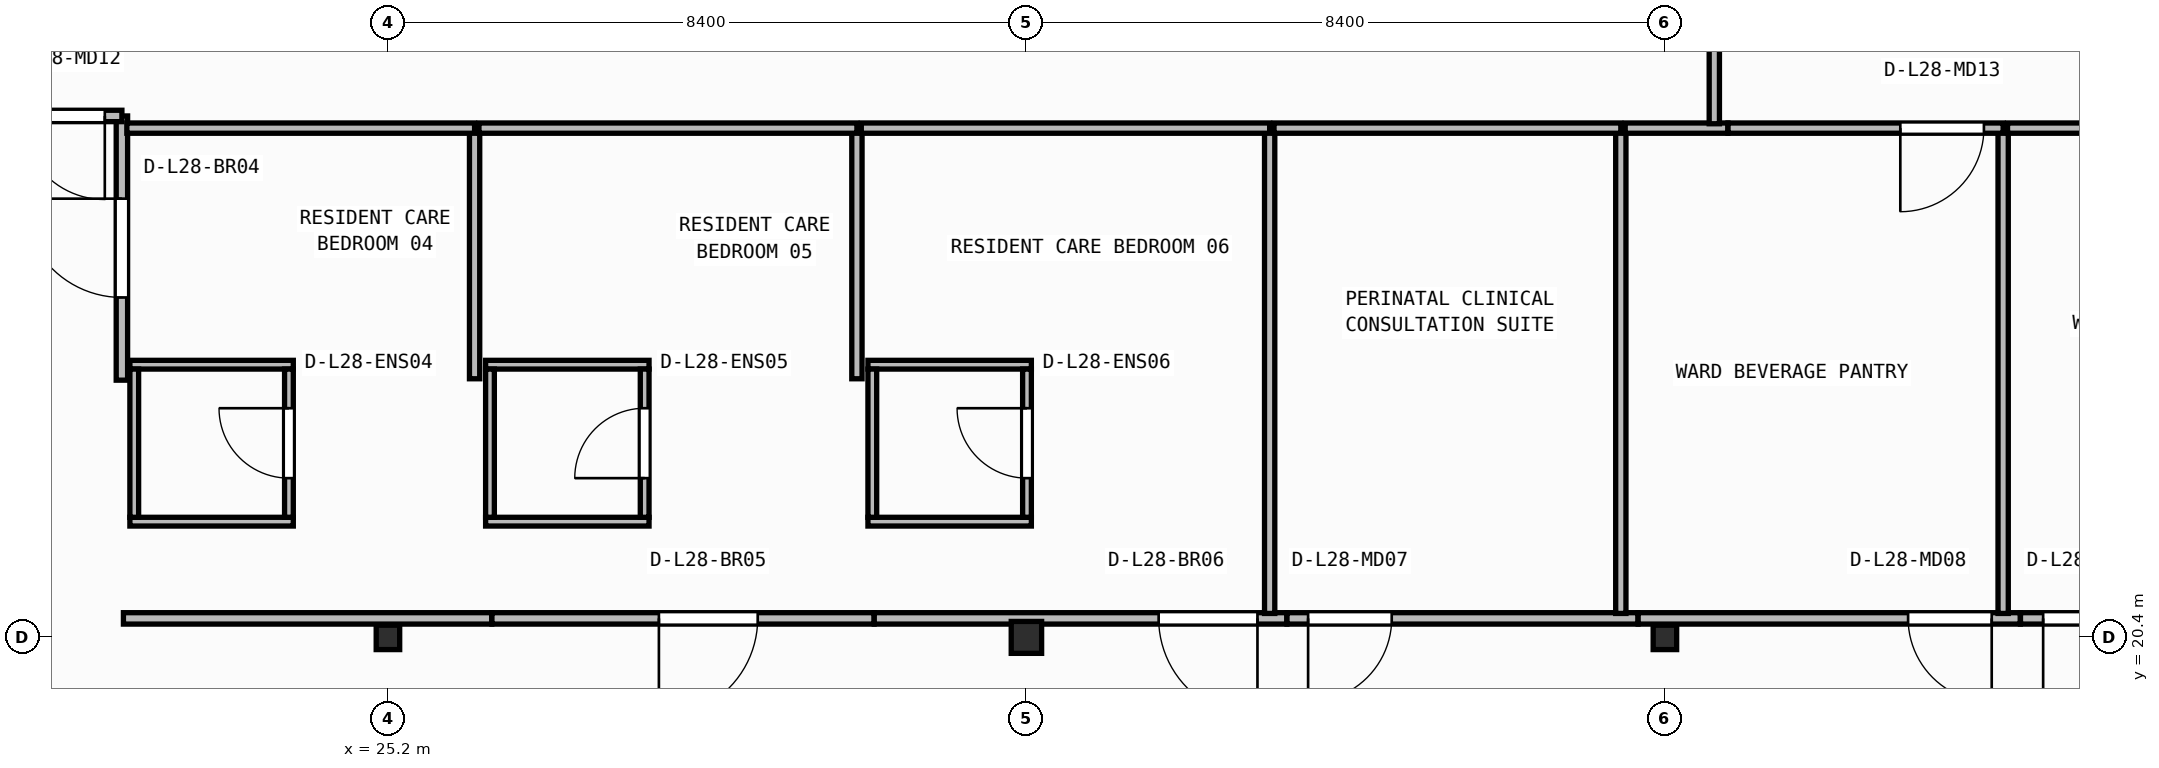
"""IFC4 building model, lengths in metres.
Left out: names, types, materials, properties, quantities, classifications, styles, units other than length and angle.
Written with IfcOpenShell. Run it as: python <this file> out.ifc"""

import sys

from ifc_helpers import new_model, si_unit, direction, frame, frame_2d, origin, origin_2d, place, context, subcontext, project, spatial, rectangle, i_section, extrude, element, fill, save


model = new_model("IFC4")
c1 = context("Model", 3, precision=1e-05, world=origin(), true_north=direction((0.0, 1.0)))
c2 = subcontext(c1, "Body", "Model", "MODEL_VIEW")
j1 = project(units=[si_unit("LENGTHUNIT", "METRE"), si_unit("PLANEANGLEUNIT", "RADIAN")], contexts=[c1])
p1 = place(None, origin())
s1 = spatial("IfcSite", under=j1, at=p1, CompositionType="ELEMENT")
p2 = place(p1, origin())
s2 = spatial("IfcBuilding", under=s1, at=p2, CompositionType="ELEMENT")
p3 = place(p2, frame((0.0, 0.0, 115.2)))
s3 = spatial("IfcBuildingStorey", under=s2, at=p3, CompositionType="ELEMENT", Elevation=115.2)
p4 = place(p3, frame((25.2, 20.4, 0.0), z_axis=(0.0, 0.0, 1.0), x_axis=(1.0, 0.0, 0.0)))
e1 = element("IfcColumn", 1, at=p4, inside=s3, PredefinedType="COLUMN", context=c2, shape_type="SweptSolid", body=[
    extrude(i_section(OverallWidth=0.309, OverallDepth=0.321, WebThickness=0.014, FlangeThickness=0.022, FilletRadius=0.017, at=origin_2d()), origin(), (0.0, 0.0, 1.0), 3.95),
])
p5 = place(p3, frame((33.6, 20.4, 0.0), z_axis=(0.0, 0.0, 1.0), x_axis=(1.0, 0.0, 0.0)))
e2 = element("IfcColumn", 2, at=p5, inside=s3, PredefinedType="COLUMN", context=c2, shape_type="SweptSolid", body=[
    extrude(i_section(OverallWidth=0.4, OverallDepth=0.42, WebThickness=0.025, FlangeThickness=0.04, at=origin_2d()), origin(), (0.0, 0.0, 1.0), 3.95),
])
p6 = place(p3, frame((42.0, 20.4, 0.0), z_axis=(0.0, 0.0, 1.0), x_axis=(1.0, 0.0, 0.0)))
e3 = element("IfcColumn", 3, at=p6, inside=s3, PredefinedType="COLUMN", context=c2, shape_type="SweptSolid", body=[
    extrude(i_section(OverallWidth=0.309, OverallDepth=0.321, WebThickness=0.014, FlangeThickness=0.022, FilletRadius=0.017, at=origin_2d()), origin(), (0.0, 0.0, 1.0), 3.95),
])
for number, where, z_axis, x_axis in (
    (4, (21.805, 21.923, 0.0), (0.0, 0.0, 1.0), (1.0, 0.0, 0.0)),
    (5, (21.805, 23.988, 0.0), (0.0, 0.0, 1.0), (1.0, 0.0, 0.0)),
):
    element("IfcWall", number, at=place(p3, frame(where, z_axis=z_axis, x_axis=x_axis)), inside=s3, PredefinedType="PARTITIONING", context=c2, shape_type="SweptSolid", body=[
        extrude(rectangle(XDim=2.15, YDim=0.115, at=frame_2d((1.075, 0.0))), origin(), (0.0, 0.0, 1.0), 3.71),
    ])
p7 = place(p3, frame((21.863, 21.98, 0.0), z_axis=(0.0, 0.0, 1.0), x_axis=(0.0, 1.0, 0.0)))
e6 = element("IfcWall", 6, at=p7, inside=s3, PredefinedType="PARTITIONING", context=c2, shape_type="SweptSolid", body=[
    extrude(rectangle(XDim=1.95, YDim=0.115, at=frame_2d((0.975, 0.0))), origin(), (0.0, 0.0, 1.0), 3.71),
])
p8 = place(p3, frame((23.897, 21.98, 0.0), z_axis=(0.0, 0.0, 1.0), x_axis=(0.0, 1.0, 0.0)))
e7 = element("IfcWall", 7, at=p8, inside=s3, PredefinedType="PARTITIONING", context=c2, shape_type="SweptSolid", body=[
    extrude(rectangle(XDim=1.95, YDim=0.115, at=frame_2d((0.975, 0.0))), origin(), (0.0, 0.0, 1.0), 3.71),
])
p9 = place(p8, frame((0.515, 0.0, 0.0)))
e8 = element("IfcOpeningElement", 8, at=p9, cuts=e7, PredefinedType="OPENING", context=c2, shape_type="SweptSolid", body=[
    extrude(rectangle(XDim=0.92, YDim=2.1, at=frame_2d((0.46, 1.05))), frame((0.0, 0.067, 0.0), z_axis=(0.0, -1.0, 0.0), x_axis=(1.0, 0.0, 0.0)), (0.0, 0.0, 1.0), 0.135),
])
for number, where, z_axis, x_axis in (
    (9, (26.485, 21.923, 0.0), (0.0, 0.0, 1.0), (1.0, 0.0, 0.0)),
    (10, (26.485, 23.988, 0.0), (0.0, 0.0, 1.0), (1.0, 0.0, 0.0)),
):
    element("IfcWall", number, at=place(p3, frame(where, z_axis=z_axis, x_axis=x_axis)), inside=s3, PredefinedType="PARTITIONING", context=c2, shape_type="SweptSolid", body=[
        extrude(rectangle(XDim=2.15, YDim=0.115, at=frame_2d((1.075, 0.0))), origin(), (0.0, 0.0, 1.0), 3.71),
    ])
p10 = place(p3, frame((26.542, 21.98, 0.0), z_axis=(0.0, 0.0, 1.0), x_axis=(0.0, 1.0, 0.0)))
e11 = element("IfcWall", 11, at=p10, inside=s3, PredefinedType="PARTITIONING", context=c2, shape_type="SweptSolid", body=[
    extrude(rectangle(XDim=1.95, YDim=0.115, at=frame_2d((0.975, 0.0))), origin(), (0.0, 0.0, 1.0), 3.71),
])
p11 = place(p3, frame((28.577, 21.98, 0.0), z_axis=(0.0, 0.0, 1.0), x_axis=(0.0, 1.0, 0.0)))
e12 = element("IfcWall", 12, at=p11, inside=s3, PredefinedType="PARTITIONING", context=c2, shape_type="SweptSolid", body=[
    extrude(rectangle(XDim=1.95, YDim=0.115, at=frame_2d((0.975, 0.0))), origin(), (0.0, 0.0, 1.0), 3.71),
])
p12 = place(p11, frame((0.515, 0.0, 0.0)))
e13 = element("IfcOpeningElement", 13, at=p12, cuts=e12, PredefinedType="OPENING", context=c2, shape_type="SweptSolid", body=[
    extrude(rectangle(XDim=0.92, YDim=2.1, at=frame_2d((0.46, 1.05))), frame((0.0, 0.067, 0.0), z_axis=(0.0, -1.0, 0.0), x_axis=(1.0, 0.0, 0.0)), (0.0, 0.0, 1.0), 0.135),
])
for number, where, z_axis, x_axis in (
    (14, (31.515, 21.923, 0.0), (0.0, 0.0, 1.0), (1.0, 0.0, 0.0)),
    (15, (31.515, 23.988, 0.0), (0.0, 0.0, 1.0), (1.0, 0.0, 0.0)),
):
    element("IfcWall", number, at=place(p3, frame(where, z_axis=z_axis, x_axis=x_axis)), inside=s3, PredefinedType="PARTITIONING", context=c2, shape_type="SweptSolid", body=[
        extrude(rectangle(XDim=2.15, YDim=0.115, at=frame_2d((1.075, 0.0))), origin(), (0.0, 0.0, 1.0), 3.71),
    ])
p13 = place(p3, frame((31.573, 21.98, 0.0), z_axis=(0.0, 0.0, 1.0), x_axis=(0.0, 1.0, 0.0)))
e16 = element("IfcWall", 16, at=p13, inside=s3, PredefinedType="PARTITIONING", context=c2, shape_type="SweptSolid", body=[
    extrude(rectangle(XDim=1.95, YDim=0.115, at=frame_2d((0.975, 0.0))), origin(), (0.0, 0.0, 1.0), 3.71),
])
p14 = place(p3, frame((33.607, 21.98, 0.0), z_axis=(0.0, 0.0, 1.0), x_axis=(0.0, 1.0, 0.0)))
e17 = element("IfcWall", 17, at=p14, inside=s3, PredefinedType="PARTITIONING", context=c2, shape_type="SweptSolid", body=[
    extrude(rectangle(XDim=1.95, YDim=0.115, at=frame_2d((0.975, 0.0))), origin(), (0.0, 0.0, 1.0), 3.152),
])
p15 = place(p14, frame((0.515, 0.0, 0.0)))
e18 = element("IfcOpeningElement", 18, at=p15, cuts=e17, PredefinedType="OPENING", context=c2, shape_type="SweptSolid", body=[
    extrude(rectangle(XDim=0.92, YDim=2.1, at=frame_2d((0.46, 1.05))), frame((0.0, 0.067, 0.0), z_axis=(0.0, -1.0, 0.0), x_axis=(1.0, 0.0, 0.0)), (0.0, 0.0, 1.0), 0.135),
])
p16 = place(p3, frame((21.7, 23.784, 0.0), z_axis=(0.0, 0.0, 1.0), x_axis=(0.0, 1.0, 0.0)))
e19 = element("IfcWall", 19, at=p16, inside=s3, PredefinedType="PARTITIONING", context=c2, shape_type="SweptSolid", body=[
    extrude(rectangle(XDim=3.476, YDim=0.15, at=frame_2d((1.738, 0.0))), origin(), (0.0, 0.0, 1.0), 3.71),
])
p17 = place(p16, frame((1.088, 0.0, 0.0)))
e20 = element("IfcOpeningElement", 20, at=p17, cuts=e19, PredefinedType="OPENING", context=c2, shape_type="SweptSolid", body=[
    extrude(rectangle(XDim=1.3, YDim=2.15, at=frame_2d((0.65, 1.075))), frame((0.0, 0.085, 0.0), z_axis=(0.0, -1.0, 0.0), x_axis=(1.0, 0.0, 0.0)), (0.0, 0.0, 1.0), 0.17),
])
p18 = place(p3, frame((21.7, 27.26, 0.0), z_axis=(0.0, 0.0, 1.0), x_axis=(-1.0, 0.0, 0.0)))
e21 = element("IfcWall", 21, at=p18, inside=s3, PredefinedType="PARTITIONING", context=c2, shape_type="SweptSolid", body=[
    extrude(rectangle(XDim=2.5, YDim=0.15, at=frame_2d((1.25, 0.0))), origin(), (0.0, 0.0, 1.0), 3.71),
])
p19 = place(p18, frame((0.225, 0.0, 0.0)))
e22 = element("IfcOpeningElement", 22, at=p19, cuts=e21, PredefinedType="OPENING", context=c2, shape_type="SweptSolid", body=[
    extrude(rectangle(XDim=1.1, YDim=2.1, at=frame_2d((0.55, 1.05))), frame((0.0, 0.085, 0.0), z_axis=(0.0, -1.0, 0.0), x_axis=(1.0, 0.0, 0.0)), (0.0, 0.0, 1.0), 0.17),
])
p20 = place(p3, frame((26.566, 20.65, 0.0), z_axis=(0.0, 0.0, 1.0), x_axis=(-1.0, 0.0, 0.0)))
e23 = element("IfcWall", 23, at=p20, inside=s3, PredefinedType="PARTITIONING", context=c2, shape_type="SweptSolid", body=[
    extrude(rectangle(XDim=4.846, YDim=0.15, at=frame_2d((2.423, 0.0))), origin(), (0.0, 0.0, 1.0), 3.083),
])
p21 = place(p3, frame((31.596, 20.65, 0.0), z_axis=(0.0, 0.0, 1.0), x_axis=(-1.0, 0.0, 0.0)))
e24 = element("IfcWall", 24, at=p21, inside=s3, PredefinedType="PARTITIONING", context=c2, shape_type="SweptSolid", body=[
    extrude(rectangle(XDim=5.028, YDim=0.15, at=frame_2d((2.514, 0.0))), origin(), (0.0, 0.0, 1.0), 3.083),
])
p22 = place(p21, frame((1.531, 0.0, 0.0)))
e25 = element("IfcOpeningElement", 25, at=p22, cuts=e24, PredefinedType="OPENING", context=c2, shape_type="SweptSolid", body=[
    extrude(rectangle(XDim=1.3, YDim=2.15, at=frame_2d((0.65, 1.075))), frame((0.0, 0.085, 0.0), z_axis=(0.0, -1.0, 0.0), x_axis=(1.0, 0.0, 0.0)), (0.0, 0.0, 1.0), 0.17),
])
p23 = place(p3, frame((37.026, 20.65, 0.0), z_axis=(0.0, 0.0, 1.0), x_axis=(-1.0, 0.0, 0.0)))
e26 = element("IfcWall", 26, at=p23, inside=s3, PredefinedType="PARTITIONING", context=c2, shape_type="SweptSolid", body=[
    extrude(rectangle(XDim=5.428, YDim=0.15, at=frame_2d((2.714, 0.0))), origin(), (0.0, 0.0, 1.0), 3.083),
])
p24 = place(p23, frame((0.386, 0.0, 0.0)))
e27 = element("IfcOpeningElement", 27, at=p24, cuts=e26, PredefinedType="OPENING", context=c2, shape_type="SweptSolid", body=[
    extrude(rectangle(XDim=1.3, YDim=2.15, at=frame_2d((0.65, 1.075))), frame((0.0, 0.085, 0.0), z_axis=(0.0, -1.0, 0.0), x_axis=(1.0, 0.0, 0.0)), (0.0, 0.0, 1.0), 0.17),
])
p25 = place(p3, frame((41.646, 20.65, 0.0), z_axis=(0.0, 0.0, 1.0), x_axis=(-1.0, 0.0, 0.0)))
e28 = element("IfcWall", 28, at=p25, inside=s3, PredefinedType="PARTITIONING", context=c2, shape_type="SweptSolid", body=[
    extrude(rectangle(XDim=4.618, YDim=0.15, at=frame_2d((2.309, 0.0))), origin(), (0.0, 0.0, 1.0), 3.083),
])
p26 = place(p25, frame((3.24, 0.0, 0.0)))
e29 = element("IfcOpeningElement", 29, at=p26, cuts=e28, PredefinedType="OPENING", context=c2, shape_type="SweptSolid", body=[
    extrude(rectangle(XDim=1.1, YDim=2.1, at=frame_2d((0.55, 1.05))), frame((0.0, 0.085, 0.0), z_axis=(0.0, -1.0, 0.0), x_axis=(1.0, 0.0, 0.0)), (0.0, 0.0, 1.0), 0.17),
])
p27 = place(p3, frame((46.676, 20.65, 0.0), z_axis=(0.0, 0.0, 1.0), x_axis=(-1.0, 0.0, 0.0)))
e30 = element("IfcWall", 30, at=p27, inside=s3, PredefinedType="PARTITIONING", context=c2, shape_type="SweptSolid", body=[
    extrude(rectangle(XDim=5.028, YDim=0.15, at=frame_2d((2.514, 0.0))), origin(), (0.0, 0.0, 1.0), 3.083),
])
p28 = place(p27, frame((0.376, 0.0, 0.0)))
e31 = element("IfcOpeningElement", 31, at=p28, cuts=e30, PredefinedType="OPENING", context=c2, shape_type="SweptSolid", body=[
    extrude(rectangle(XDim=1.1, YDim=2.1, at=frame_2d((0.55, 1.05))), frame((0.0, 0.085, 0.0), z_axis=(0.0, -1.0, 0.0), x_axis=(1.0, 0.0, 0.0)), (0.0, 0.0, 1.0), 0.17),
])
p29 = place(p3, frame((52.106, 20.65, 0.0), z_axis=(0.0, 0.0, 1.0), x_axis=(-1.0, 0.0, 0.0)))
e32 = element("IfcWall", 32, at=p29, inside=s3, PredefinedType="PARTITIONING", context=c2, shape_type="SweptSolid", body=[
    extrude(rectangle(XDim=5.428, YDim=0.15, at=frame_2d((2.714, 0.0))), origin(), (0.0, 0.0, 1.0), 3.083),
])
p30 = place(p29, frame((4.03, 0.0, 0.0)))
e33 = element("IfcOpeningElement", 33, at=p30, cuts=e32, PredefinedType="OPENING", context=c2, shape_type="SweptSolid", body=[
    extrude(rectangle(XDim=1.1, YDim=2.1, at=frame_2d((0.55, 1.05))), frame((0.0, 0.085, 0.0), z_axis=(0.0, -1.0, 0.0), x_axis=(1.0, 0.0, 0.0)), (0.0, 0.0, 1.0), 0.17),
])
p31 = place(p3, frame((26.34, 23.802, 0.0), z_axis=(0.0, 0.0, 1.0), x_axis=(0.0, 1.0, 0.0)))
e34 = element("IfcWall", 34, at=p31, inside=s3, PredefinedType="PARTITIONING", context=c2, shape_type="SweptSolid", body=[
    extrude(rectangle(XDim=3.298, YDim=0.135, at=frame_2d((1.649, 0.0))), origin(), (0.0, 0.0, 1.0), 3.71),
])
p32 = place(p3, frame((26.34, 27.1, 0.0), z_axis=(0.0, 0.0, 1.0), x_axis=(-1.0, 0.0, 0.0)))
e35 = element("IfcWall", 35, at=p32, inside=s3, PredefinedType="PARTITIONING", context=c2, shape_type="SweptSolid", body=[
    extrude(rectangle(XDim=4.575, YDim=0.135, at=frame_2d((2.288, 0.0))), origin(), (0.0, 0.0, 1.0), 3.71),
])
p33 = place(p3, frame((31.37, 23.802, 0.0), z_axis=(0.0, 0.0, 1.0), x_axis=(0.0, 1.0, 0.0)))
e36 = element("IfcWall", 36, at=p33, inside=s3, PredefinedType="PARTITIONING", context=c2, shape_type="SweptSolid", body=[
    extrude(rectangle(XDim=3.298, YDim=0.135, at=frame_2d((1.649, 0.0))), origin(), (0.0, 0.0, 1.0), 3.71),
])
p34 = place(p3, frame((31.37, 27.1, 0.0), z_axis=(0.0, 0.0, 1.0), x_axis=(-1.0, 0.0, 0.0)))
e37 = element("IfcWall", 37, at=p34, inside=s3, PredefinedType="PARTITIONING", context=c2, shape_type="SweptSolid", body=[
    extrude(rectangle(XDim=4.973, YDim=0.135, at=frame_2d((2.486, 0.0))), origin(), (0.0, 0.0, 1.0), 3.71),
])
p35 = place(p3, frame((36.8, 20.715, 0.0), z_axis=(0.0, 0.0, 1.0), x_axis=(0.0, 1.0, 0.0)))
e38 = element("IfcWall", 38, at=p35, inside=s3, PredefinedType="PARTITIONING", context=c2, shape_type="SweptSolid", body=[
    extrude(rectangle(XDim=6.385, YDim=0.135, at=frame_2d((3.192, 0.0))), origin(), (0.0, 0.0, 1.0), 3.71),
])
p36 = place(p3, frame((36.8, 27.1, 0.0), z_axis=(0.0, 0.0, 1.0), x_axis=(-1.0, 0.0, 0.0)))
e39 = element("IfcWall", 39, at=p36, inside=s3, PredefinedType="PARTITIONING", context=c2, shape_type="SweptSolid", body=[
    extrude(rectangle(XDim=5.373, YDim=0.135, at=frame_2d((2.686, 0.0))), origin(), (0.0, 0.0, 1.0), 3.71),
])
p37 = place(p3, frame((41.42, 20.715, 0.0), z_axis=(0.0, 0.0, 1.0), x_axis=(0.0, 1.0, 0.0)))
e40 = element("IfcWall", 40, at=p37, inside=s3, PredefinedType="PARTITIONING", context=c2, shape_type="SweptSolid", body=[
    extrude(rectangle(XDim=6.385, YDim=0.135, at=frame_2d((3.192, 0.0))), origin(), (0.0, 0.0, 1.0), 3.71),
])
p38 = place(p3, frame((41.42, 27.1, 0.0), z_axis=(0.0, 0.0, 1.0), x_axis=(-1.0, 0.0, 0.0)))
e41 = element("IfcWall", 41, at=p38, inside=s3, PredefinedType="PARTITIONING", context=c2, shape_type="SweptSolid", body=[
    extrude(rectangle(XDim=4.562, YDim=0.135, at=frame_2d((2.281, 0.0))), origin(), (0.0, 0.0, 1.0), 3.71),
])
p39 = place(p3, frame((46.45, 20.715, 0.0), z_axis=(0.0, 0.0, 1.0), x_axis=(0.0, 1.0, 0.0)))
e42 = element("IfcWall", 42, at=p39, inside=s3, PredefinedType="PARTITIONING", context=c2, shape_type="SweptSolid", body=[
    extrude(rectangle(XDim=6.385, YDim=0.135, at=frame_2d((3.192, 0.0))), origin(), (0.0, 0.0, 1.0), 3.71),
])
p40 = place(p3, frame((42.829, 27.1, 0.0), z_axis=(0.0, 0.0, 1.0), x_axis=(-1.0, 0.0, 0.0)))
e43 = element("IfcWall", 43, at=p40, inside=s3, PredefinedType="PARTITIONING", context=c2, shape_type="SweptSolid", body=[
    extrude(rectangle(XDim=1.351, YDim=0.135, at=frame_2d((0.676, 0.0))), origin(), (0.0, 0.0, 1.0), 3.71),
])
p41 = place(p3, frame((46.45, 27.1, 0.0), z_axis=(0.0, 0.0, 1.0), x_axis=(-1.0, 0.0, 0.0)))
e44 = element("IfcWall", 44, at=p41, inside=s3, PredefinedType="PARTITIONING", context=c2, shape_type="SweptSolid", body=[
    extrude(rectangle(XDim=3.619, YDim=0.135, at=frame_2d((1.81, 0.0))), origin(), (0.0, 0.0, 1.0), 3.71),
])
p42 = place(p41, frame((0.253, 0.0, 0.0)))
e45 = element("IfcOpeningElement", 45, at=p42, cuts=e44, PredefinedType="OPENING", context=c2, shape_type="SweptSolid", body=[
    extrude(rectangle(XDim=1.1, YDim=2.1, at=frame_2d((0.55, 1.05))), frame((0.0, 0.077, 0.0), z_axis=(0.0, -1.0, 0.0), x_axis=(1.0, 0.0, 0.0)), (0.0, 0.0, 1.0), 0.155),
])
p43 = place(p3, frame((51.88, 27.1, 0.0), z_axis=(0.0, 0.0, 1.0), x_axis=(-1.0, 0.0, 0.0)))
e46 = element("IfcWall", 46, at=p43, inside=s3, PredefinedType="PARTITIONING", context=c2, shape_type="SweptSolid", body=[
    extrude(rectangle(XDim=5.372, YDim=0.135, at=frame_2d((2.686, 0.0))), origin(), (0.0, 0.0, 1.0), 3.71),
])
p44 = place(p3, frame((42.65, 27.157, 0.0), z_axis=(0.0, 0.0, 1.0), x_axis=(0.0, 1.0, 0.0)))
e47 = element("IfcWall", 47, at=p44, inside=s3, PredefinedType="PARTITIONING", context=c2, shape_type="SweptSolid", body=[
    extrude(rectangle(XDim=4.381, YDim=0.135, at=frame_2d((2.191, 0.0))), origin(), (0.0, 0.0, 1.0), 3.71),
])
p45 = place(p9, origin())
e48 = element("IfcDoor", 48, at=p45, inside=s3, OperationType="SINGLE_SWING_RIGHT", PredefinedType="DOOR", context=c2, shape_type="SweptSolid", body=[
    extrude(rectangle(XDim=0.92, YDim=2.1, at=frame_2d((0.46, 1.05))), frame((0.0, 0.025, 0.0), z_axis=(0.0, -1.0, 0.0), x_axis=(1.0, 0.0, 0.0)), (0.0, 0.0, 1.0), 0.05),
])
fill(e8, e48)
p46 = place(p12, origin())
e49 = element("IfcDoor", 49, at=p46, inside=s3, OperationType="SINGLE_SWING_LEFT", PredefinedType="DOOR", context=c2, shape_type="SweptSolid", body=[
    extrude(rectangle(XDim=0.92, YDim=2.1, at=frame_2d((0.46, 1.05))), frame((0.0, 0.025, 0.0), z_axis=(0.0, -1.0, 0.0), x_axis=(1.0, 0.0, 0.0)), (0.0, 0.0, 1.0), 0.05),
])
fill(e13, e49)
p47 = place(p15, origin())
e50 = element("IfcDoor", 50, at=p47, inside=s3, OperationType="SINGLE_SWING_RIGHT", PredefinedType="DOOR", context=c2, shape_type="SweptSolid", body=[
    extrude(rectangle(XDim=0.92, YDim=2.1, at=frame_2d((0.46, 1.05))), frame((0.0, 0.025, 0.0), z_axis=(0.0, -1.0, 0.0), x_axis=(1.0, 0.0, 0.0)), (0.0, 0.0, 1.0), 0.05),
])
fill(e18, e50)
p48 = place(p17, origin())
e51 = element("IfcDoor", 51, at=p48, inside=s3, OperationType="SINGLE_SWING_RIGHT", PredefinedType="DOOR", context=c2, shape_type="SweptSolid", body=[
    extrude(rectangle(XDim=1.3, YDim=2.15, at=frame_2d((0.65, 1.075))), frame((0.0, 0.025, 0.0), z_axis=(0.0, -1.0, 0.0), x_axis=(1.0, 0.0, 0.0)), (0.0, 0.0, 1.0), 0.05),
])
fill(e20, e51)
p49 = place(p19, origin())
e52 = element("IfcDoor", 52, at=p49, inside=s3, OperationType="SINGLE_SWING_LEFT", PredefinedType="DOOR", context=c2, shape_type="SweptSolid", body=[
    extrude(rectangle(XDim=1.1, YDim=2.1, at=frame_2d((0.55, 1.05))), frame((0.0, 0.025, 0.0), z_axis=(0.0, -1.0, 0.0), x_axis=(1.0, 0.0, 0.0)), (0.0, 0.0, 1.0), 0.05),
])
fill(e22, e52)
p50 = place(p22, origin())
e53 = element("IfcDoor", 53, at=p50, inside=s3, OperationType="SINGLE_SWING_RIGHT", PredefinedType="DOOR", context=c2, shape_type="SweptSolid", body=[
    extrude(rectangle(XDim=1.3, YDim=2.15, at=frame_2d((0.65, 1.075))), frame((0.0, 0.025, 0.0), z_axis=(0.0, -1.0, 0.0), x_axis=(1.0, 0.0, 0.0)), (0.0, 0.0, 1.0), 0.05),
])
fill(e25, e53)
p51 = place(p24, origin())
e54 = element("IfcDoor", 54, at=p51, inside=s3, OperationType="SINGLE_SWING_LEFT", PredefinedType="DOOR", context=c2, shape_type="SweptSolid", body=[
    extrude(rectangle(XDim=1.3, YDim=2.15, at=frame_2d((0.65, 1.075))), frame((0.0, 0.025, 0.0), z_axis=(0.0, -1.0, 0.0), x_axis=(1.0, 0.0, 0.0)), (0.0, 0.0, 1.0), 0.05),
])
fill(e27, e54)
p52 = place(p26, origin())
e55 = element("IfcDoor", 55, at=p52, inside=s3, OperationType="SINGLE_SWING_RIGHT", PredefinedType="DOOR", context=c2, shape_type="SweptSolid", body=[
    extrude(rectangle(XDim=1.1, YDim=2.1, at=frame_2d((0.55, 1.05))), frame((0.0, 0.025, 0.0), z_axis=(0.0, -1.0, 0.0), x_axis=(1.0, 0.0, 0.0)), (0.0, 0.0, 1.0), 0.05),
])
fill(e29, e55)
p53 = place(p28, origin())
e56 = element("IfcDoor", 56, at=p53, inside=s3, OperationType="SINGLE_SWING_LEFT", PredefinedType="DOOR", context=c2, shape_type="SweptSolid", body=[
    extrude(rectangle(XDim=1.1, YDim=2.1, at=frame_2d((0.55, 1.05))), frame((0.0, 0.025, 0.0), z_axis=(0.0, -1.0, 0.0), x_axis=(1.0, 0.0, 0.0)), (0.0, 0.0, 1.0), 0.05),
])
fill(e31, e56)
p54 = place(p30, origin())
e57 = element("IfcDoor", 57, at=p54, inside=s3, OperationType="SINGLE_SWING_RIGHT", PredefinedType="DOOR", context=c2, shape_type="SweptSolid", body=[
    extrude(rectangle(XDim=1.1, YDim=2.1, at=frame_2d((0.55, 1.05))), frame((0.0, 0.025, 0.0), z_axis=(0.0, -1.0, 0.0), x_axis=(1.0, 0.0, 0.0)), (0.0, 0.0, 1.0), 0.05),
])
fill(e33, e57)
p55 = place(p42, origin())
e58 = element("IfcDoor", 58, at=p55, inside=s3, OperationType="SINGLE_SWING_RIGHT", PredefinedType="DOOR", context=c2, shape_type="SweptSolid", body=[
    extrude(rectangle(XDim=1.1, YDim=2.1, at=frame_2d((0.55, 1.05))), frame((0.0, 0.025, 0.0), z_axis=(0.0, -1.0, 0.0), x_axis=(1.0, 0.0, 0.0)), (0.0, 0.0, 1.0), 0.05),
])
fill(e45, e58)
save(model, sys.argv[1])
